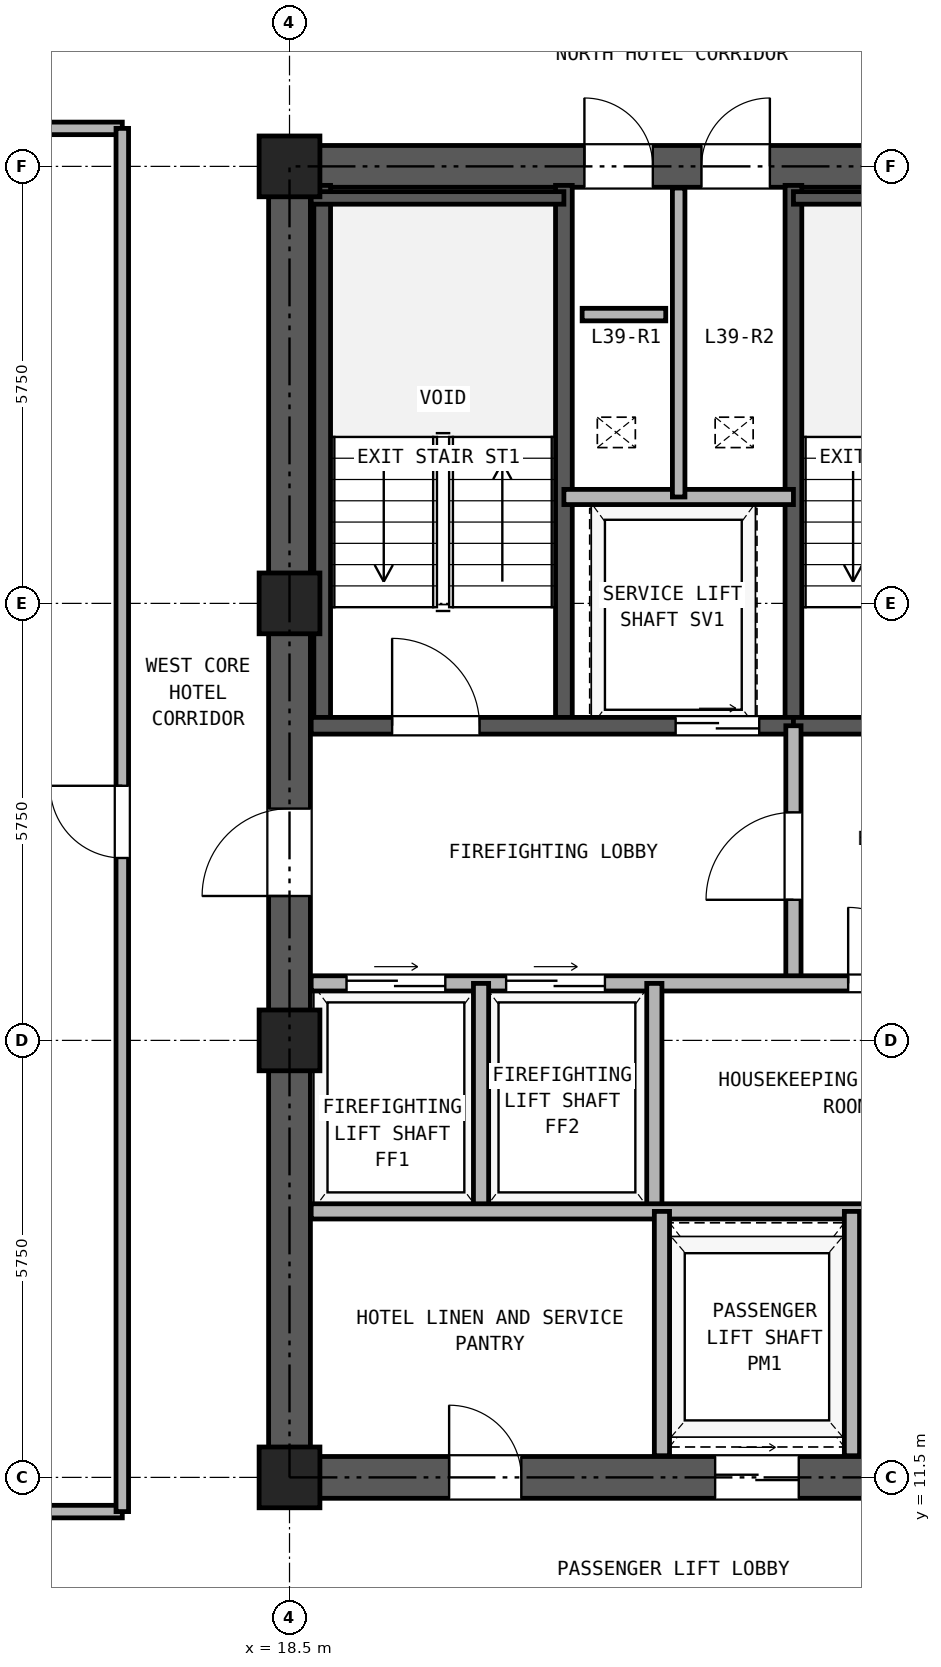
"""IFC4 building model, lengths in metres.
Left out: names, types, materials, properties, quantities, classifications, styles, units other than length and angle.
Written with IfcOpenShell. Run it as: python <this file> out.ifc"""

import sys

from ifc_helpers import new_model, si_unit, direction, frame, frame_2d, origin, origin_2d, place, context, subcontext, project, spatial, rectangle, hollow_rectangle, extrude, source, transform, mapped, element, fill, save


model = new_model("IFC4")
c1 = context("Model", 3, precision=1e-05, world=origin(), true_north=direction((0.0, 1.0)))
c2 = subcontext(c1, "Body", "Model", "MODEL_VIEW")
j1 = project(units=[si_unit("LENGTHUNIT", "METRE"), si_unit("PLANEANGLEUNIT", "RADIAN")], contexts=[c1])
p1 = place(None, origin())
s1 = spatial("IfcSite", under=j1, at=p1, CompositionType="ELEMENT")
p2 = place(p1, origin())
s2 = spatial("IfcBuilding", under=s1, at=p2, CompositionType="ELEMENT")
p3 = place(p2, frame((0.0, 0.0, 140.7)))
s3 = spatial("IfcBuildingStorey", under=s2, at=p3, CompositionType="ELEMENT", Elevation=140.7)
m1 = source(origin(), c2, "Body", "SweptSolid", [
    extrude(hollow_rectangle(XDim=0.8, YDim=0.8, WallThickness=0.045, at=origin_2d()), origin(), (0.0, 0.0, 1.0), 2.84),
])
for number, where, z_axis, x_axis in (
    (1, (18.5, 11.5, 0.0), (0.0, 0.0, 1.0), (1.0, 0.0, 0.0)),
    (2, (18.5, 17.25, 0.0), (0.0, 0.0, 1.0), (1.0, 0.0, 0.0)),
    (3, (18.5, 23.0, 0.0), (0.0, 0.0, 1.0), (1.0, 0.0, 0.0)),
    (4, (18.5, 28.75, 0.0), (0.0, 0.0, 1.0), (1.0, 0.0, 0.0)),
):
    element("IfcColumn", number, at=place(p3, frame(where, z_axis=z_axis, x_axis=x_axis)), inside=s3, PredefinedType="COLUMN", context=c2, shape_type="MappedRepresentation", body=[
        mapped(m1, transform((0.0, 0.0, 0.0), x_axis=(1.0, 0.0, 0.0), y_axis=(0.0, 1.0, 0.0), z_axis=(0.0, 0.0, 1.0), scale=1.0)),
    ])
p4 = place(p3, frame((18.225, 11.5, 0.0), z_axis=(0.0, 0.0, 1.0), x_axis=(1.0, 0.0, 0.0)))
e5 = element("IfcWall", 5, at=p4, inside=s3, PredefinedType="SHEAR", context=c2, shape_type="SweptSolid", body=[
    extrude(rectangle(XDim=10.55, YDim=0.55, at=frame_2d((5.275, 0.0))), origin(), (0.0, 0.0, 1.0), 2.84),
])
p5 = place(p4, frame((2.375, 0.0, 0.0)))
e6 = element("IfcOpeningElement", 6, at=p5, cuts=e5, PredefinedType="OPENING", context=c2, shape_type="SweptSolid", body=[
    extrude(rectangle(XDim=0.95, YDim=2.15, at=frame_2d((0.475, 1.075))), frame((0.0, 0.285, 0.0), z_axis=(0.0, -1.0, 0.0), x_axis=(1.0, 0.0, 0.0)), (0.0, 0.0, 1.0), 0.57),
])
p6 = place(p4, frame((5.875, 0.0, 0.0)))
e7 = element("IfcOpeningElement", 7, at=p6, cuts=e5, PredefinedType="OPENING", context=c2, shape_type="SweptSolid", body=[
    extrude(rectangle(XDim=1.1, YDim=2.25, at=frame_2d((0.55, 1.125))), frame((0.0, 0.285, 0.0), z_axis=(0.0, -1.0, 0.0), x_axis=(1.0, 0.0, 0.0)), (0.0, 0.0, 1.0), 0.57),
])
p7 = place(p4, frame((8.275, 0.0, 0.0)))
e8 = element("IfcOpeningElement", 8, at=p7, cuts=e5, PredefinedType="OPENING", context=c2, shape_type="SweptSolid", body=[
    extrude(rectangle(XDim=1.1, YDim=2.25, at=frame_2d((0.55, 1.125))), frame((0.0, 0.285, 0.0), z_axis=(0.0, -1.0, 0.0), x_axis=(1.0, 0.0, 0.0)), (0.0, 0.0, 1.0), 0.57),
])
p8 = place(p3, frame((18.225, 28.75, 0.0), z_axis=(0.0, 0.0, 1.0), x_axis=(1.0, 0.0, 0.0)))
e9 = element("IfcWall", 9, at=p8, inside=s3, PredefinedType="SHEAR", context=c2, shape_type="SweptSolid", body=[
    extrude(rectangle(XDim=10.55, YDim=0.55, at=frame_2d((5.275, 0.0))), origin(), (0.0, 0.0, 1.0), 2.84),
])
p9 = place(p8, frame((4.155, 0.0, 0.0)))
e10 = element("IfcOpeningElement", 10, at=p9, cuts=e9, PredefinedType="OPENING", context=c2, shape_type="SweptSolid", body=[
    extrude(rectangle(XDim=0.9, YDim=2.05, at=frame_2d((0.45, 1.025))), frame((0.0, 0.285, 0.0), z_axis=(0.0, -1.0, 0.0), x_axis=(1.0, 0.0, 0.0)), (0.0, 0.0, 1.0), 0.57),
])
p10 = place(p8, frame((5.695, 0.0, 0.0)))
e11 = element("IfcOpeningElement", 11, at=p10, cuts=e9, PredefinedType="OPENING", context=c2, shape_type="SweptSolid", body=[
    extrude(rectangle(XDim=0.9, YDim=2.05, at=frame_2d((0.45, 1.025))), frame((0.0, 0.285, 0.0), z_axis=(0.0, -1.0, 0.0), x_axis=(1.0, 0.0, 0.0)), (0.0, 0.0, 1.0), 0.57),
])
p11 = place(p3, frame((18.5, 11.775, 0.0), z_axis=(0.0, 0.0, 1.0), x_axis=(0.0, 1.0, 0.0)))
e12 = element("IfcWall", 12, at=p11, inside=s3, PredefinedType="SHEAR", context=c2, shape_type="SweptSolid", body=[
    extrude(rectangle(XDim=16.7, YDim=0.55, at=frame_2d((8.35, 0.0))), origin(), (0.0, 0.0, 1.0), 2.84),
])
p12 = place(p11, frame((7.375, 0.0, 0.0)))
e13 = element("IfcOpeningElement", 13, at=p12, cuts=e12, PredefinedType="OPENING", context=c2, shape_type="SweptSolid", body=[
    extrude(rectangle(XDim=1.15, YDim=2.2, at=frame_2d((0.575, 1.1))), frame((0.0, 0.285, 0.0), z_axis=(0.0, -1.0, 0.0), x_axis=(1.0, 0.0, 0.0)), (0.0, 0.0, 1.0), 0.57),
])
for number, where, z_axis, x_axis in (
    (14, (18.93, 21.39, 0.0), (0.0, 0.0, 1.0), (0.0, 1.0, 0.0)),
    (15, (22.11, 21.39, 0.0), (0.0, 0.0, 1.0), (0.0, 1.0, 0.0)),
    (16, (25.13, 21.39, 0.0), (0.0, 0.0, 1.0), (0.0, 1.0, 0.0)),
):
    element("IfcWall", number, at=place(p3, frame(where, z_axis=z_axis, x_axis=x_axis)), inside=s3, PredefinedType="SOLIDWALL", context=c2, shape_type="SweptSolid", body=[
        extrude(rectangle(XDim=7.11, YDim=0.22, at=frame_2d((3.555, 0.0))), origin(), (0.0, 0.0, 1.0), 2.84),
    ])
p13 = place(p3, frame((18.785, 28.335, 0.0), z_axis=(0.0, 0.0, 1.0), x_axis=(1.0, 0.0, 0.0)))
e17 = element("IfcWall", 17, at=p13, inside=s3, PredefinedType="PARTITIONING", context=c2, shape_type="SweptSolid", body=[
    extrude(rectangle(XDim=3.325, YDim=0.165, at=frame_2d((1.663, 0.0))), origin(), (0.0, 0.0, 1.0), 2.84),
])
p14 = place(p3, frame((25.13, 28.335, 0.0), z_axis=(0.0, 0.0, 1.0), x_axis=(1.0, 0.0, 0.0)))
e18 = element("IfcWall", 18, at=p14, inside=s3, PredefinedType="PARTITIONING", context=c2, shape_type="SweptSolid", body=[
    extrude(rectangle(XDim=3.085, YDim=0.165, at=frame_2d((1.542, 0.0))), origin(), (0.0, 0.0, 1.0), 2.84),
])
p15 = place(p3, frame((18.785, 21.39, 0.0), z_axis=(0.0, 0.0, 1.0), x_axis=(1.0, 0.0, 0.0)))
e19 = element("IfcWall", 19, at=p15, inside=s3, PredefinedType="SOLIDWALL", context=c2, shape_type="SweptSolid", body=[
    extrude(rectangle(XDim=6.345, YDim=0.22, at=frame_2d((3.172, 0.0))), origin(), (0.0, 0.0, 1.0), 2.84),
])
p16 = place(p15, frame((1.065, 0.0, 0.0)))
e20 = element("IfcOpeningElement", 20, at=p16, cuts=e19, PredefinedType="OPENING", context=c2, shape_type="SweptSolid", body=[
    extrude(rectangle(XDim=1.15, YDim=2.2, at=frame_2d((0.575, 1.1))), frame((0.0, 0.12, 0.0), z_axis=(0.0, -1.0, 0.0), x_axis=(1.0, 0.0, 0.0)), (0.0, 0.0, 1.0), 0.24),
])
p17 = place(p15, frame((4.795, 0.0, 0.0)))
e21 = element("IfcOpeningElement", 21, at=p17, cuts=e19, PredefinedType="OPENING", context=c2, shape_type="SweptSolid", body=[
    extrude(rectangle(XDim=1.1, YDim=2.25, at=frame_2d((0.55, 1.125))), frame((0.0, 0.12, 0.0), z_axis=(0.0, -1.0, 0.0), x_axis=(1.0, 0.0, 0.0)), (0.0, 0.0, 1.0), 0.24),
])
p18 = place(p3, frame((25.13, 21.39, 0.0), z_axis=(0.0, 0.0, 1.0), x_axis=(1.0, 0.0, 0.0)))
e22 = element("IfcWall", 22, at=p18, inside=s3, PredefinedType="SOLIDWALL", context=c2, shape_type="SweptSolid", body=[
    extrude(rectangle(XDim=3.085, YDim=0.22, at=frame_2d((1.542, 0.0))), origin(), (0.0, 0.0, 1.0), 2.84),
])
p19 = place(p18, frame((0.92, 0.0, 0.0)))
e23 = element("IfcOpeningElement", 23, at=p19, cuts=e22, PredefinedType="OPENING", context=c2, shape_type="SweptSolid", body=[
    extrude(rectangle(XDim=1.15, YDim=2.2, at=frame_2d((0.575, 1.1))), frame((0.0, 0.12, 0.0), z_axis=(0.0, -1.0, 0.0), x_axis=(1.0, 0.0, 0.0)), (0.0, 0.0, 1.0), 0.24),
])
p20 = place(p3, frame((22.11, 24.4, 0.0), z_axis=(0.0, 0.0, 1.0), x_axis=(1.0, 0.0, 0.0)))
e24 = element("IfcWall", 24, at=p20, inside=s3, PredefinedType="PARTITIONING", context=c2, shape_type="SweptSolid", body=[
    extrude(rectangle(XDim=3.02, YDim=0.2, at=frame_2d((1.51, 0.0))), origin(), (0.0, 0.0, 1.0), 2.84),
])
p21 = place(p3, frame((23.62, 24.4, 0.0), z_axis=(0.0, 0.0, 1.0), x_axis=(0.0, 1.0, 0.0)))
e25 = element("IfcWall", 25, at=p21, inside=s3, PredefinedType="PARTITIONING", context=c2, shape_type="SweptSolid", body=[
    extrude(rectangle(XDim=4.065, YDim=0.165, at=frame_2d((2.033, 0.0))), origin(), (0.0, 0.0, 1.0), 2.84),
])
p22 = place(p3, frame((25.13, 18.0, 0.0), z_axis=(0.0, 0.0, 1.0), x_axis=(0.0, 1.0, 0.0)))
e26 = element("IfcWall", 26, at=p22, inside=s3, PredefinedType="PARTITIONING", context=c2, shape_type="SweptSolid", body=[
    extrude(rectangle(XDim=3.39, YDim=0.2, at=frame_2d((1.695, 0.0))), origin(), (0.0, 0.0, 1.0), 2.84),
])
p23 = place(p22, frame((1.1, 0.0, 0.0)))
e27 = element("IfcOpeningElement", 27, at=p23, cuts=e26, PredefinedType="OPENING", context=c2, shape_type="SweptSolid", body=[
    extrude(rectangle(XDim=1.15, YDim=2.2, at=frame_2d((0.575, 1.1))), frame((0.0, 0.11, 0.0), z_axis=(0.0, -1.0, 0.0), x_axis=(1.0, 0.0, 0.0)), (0.0, 0.0, 1.0), 0.22),
])
p24 = place(p3, frame((18.785, 18.0, 0.0), z_axis=(0.0, 0.0, 1.0), x_axis=(1.0, 0.0, 0.0)))
e28 = element("IfcWall", 28, at=p24, inside=s3, PredefinedType="PARTITIONING", context=c2, shape_type="SweptSolid", body=[
    extrude(rectangle(XDim=9.43, YDim=0.2, at=frame_2d((4.715, 0.0))), origin(), (0.0, 0.0, 1.0), 2.84),
])
p25 = place(p24, frame((0.465, 0.0, 0.0)))
e29 = element("IfcOpeningElement", 29, at=p25, cuts=e28, PredefinedType="OPENING", context=c2, shape_type="SweptSolid", body=[
    extrude(rectangle(XDim=1.3, YDim=2.3, at=frame_2d((0.65, 1.15))), frame((0.0, 0.11, 0.0), z_axis=(0.0, -1.0, 0.0), x_axis=(1.0, 0.0, 0.0)), (0.0, 0.0, 1.0), 0.22),
])
p26 = place(p24, frame((2.565, 0.0, 0.0)))
e30 = element("IfcOpeningElement", 30, at=p26, cuts=e28, PredefinedType="OPENING", context=c2, shape_type="SweptSolid", body=[
    extrude(rectangle(XDim=1.3, YDim=2.3, at=frame_2d((0.65, 1.15))), frame((0.0, 0.11, 0.0), z_axis=(0.0, -1.0, 0.0), x_axis=(1.0, 0.0, 0.0)), (0.0, 0.0, 1.0), 0.22),
])
p27 = place(p24, frame((7.065, 0.0, 0.0)))
e31 = element("IfcOpeningElement", 31, at=p27, cuts=e28, PredefinedType="OPENING", context=c2, shape_type="SweptSolid", body=[
    extrude(rectangle(XDim=1.0, YDim=2.15, at=frame_2d((0.5, 1.075))), frame((0.0, 0.11, 0.0), z_axis=(0.0, -1.0, 0.0), x_axis=(1.0, 0.0, 0.0)), (0.0, 0.0, 1.0), 0.22),
])
for number, where, z_axis, x_axis in (
    (32, (21.02, 15.0, 0.0), (0.0, 0.0, 1.0), (0.0, 1.0, 0.0)),
    (33, (23.3, 15.0, 0.0), (0.0, 0.0, 1.0), (0.0, 1.0, 0.0)),
):
    element("IfcWall", number, at=place(p3, frame(where, z_axis=z_axis, x_axis=x_axis)), inside=s3, PredefinedType="PARTITIONING", context=c2, shape_type="SweptSolid", body=[
        extrude(rectangle(XDim=3.0, YDim=0.2, at=frame_2d((1.5, 0.0))), origin(), (0.0, 0.0, 1.0), 2.84),
    ])
p28 = place(p3, frame((18.785, 15.0, 0.0), z_axis=(0.0, 0.0, 1.0), x_axis=(1.0, 0.0, 0.0)))
e34 = element("IfcWall", 34, at=p28, inside=s3, PredefinedType="PARTITIONING", context=c2, shape_type="SweptSolid", body=[
    extrude(rectangle(XDim=9.43, YDim=0.2, at=frame_2d((4.715, 0.0))), origin(), (0.0, 0.0, 1.0), 2.84),
])
for number, where, z_axis, x_axis in (
    (35, (23.4, 11.785, 0.0), (0.0, 0.0, 1.0), (0.0, 1.0, 0.0)),
    (36, (25.9, 11.785, 0.0), (0.0, 0.0, 1.0), (0.0, 1.0, 0.0)),
):
    element("IfcWall", number, at=place(p3, frame(where, z_axis=z_axis, x_axis=x_axis)), inside=s3, PredefinedType="PARTITIONING", context=c2, shape_type="SweptSolid", body=[
        extrude(rectangle(XDim=3.215, YDim=0.2, at=frame_2d((1.607, 0.0))), origin(), (0.0, 0.0, 1.0), 2.84),
    ])
for number, where, z_axis, x_axis in (
    (37, (8.8, 11.05, 0.0), (0.0, 0.0, 1.0), (1.0, 0.0, 0.0)),
    (38, (8.8, 29.25, 0.0), (0.0, 0.0, 1.0), (1.0, 0.0, 0.0)),
):
    element("IfcWall", number, at=place(p3, frame(where, z_axis=z_axis, x_axis=x_axis)), inside=s3, PredefinedType="PARTITIONING", context=c2, shape_type="SweptSolid", body=[
        extrude(rectangle(XDim=7.5, YDim=0.165, at=frame_2d((3.75, 0.0))), origin(), (0.0, 0.0, 1.0), 2.84),
    ])
p29 = place(p3, frame((16.3, 11.05, 0.0), z_axis=(0.0, 0.0, 1.0), x_axis=(0.0, 1.0, 0.0)))
e39 = element("IfcWall", 39, at=p29, inside=s3, PredefinedType="PARTITIONING", context=c2, shape_type="SweptSolid", body=[
    extrude(rectangle(XDim=18.2, YDim=0.165, at=frame_2d((9.1, 0.0))), origin(), (0.0, 0.0, 1.0), 2.84),
])
p30 = place(p29, frame((8.6, 0.0, 0.0)))
e40 = element("IfcOpeningElement", 40, at=p30, cuts=e39, PredefinedType="OPENING", context=c2, shape_type="SweptSolid", body=[
    extrude(rectangle(XDim=0.95, YDim=2.15, at=frame_2d((0.475, 1.075))), frame((0.0, 0.093, 0.0), z_axis=(0.0, -1.0, 0.0), x_axis=(1.0, 0.0, 0.0)), (0.0, 0.0, 1.0), 0.185),
])
p31 = place(p3, frame((22.35, 26.8, 0.0), z_axis=(0.0, 0.0, 1.0), x_axis=(1.0, 0.0, 0.0)))
e41 = element("IfcWall", 41, at=p31, inside=s3, PredefinedType="PARTITIONING", context=c2, shape_type="SweptSolid", body=[
    extrude(rectangle(XDim=1.1, YDim=0.165, at=frame_2d((0.55, 0.0))), origin(), (0.0, 0.0, 1.0), 2.84),
])
p32 = place(p16, frame((1.15, 0.0, 0.0), z_axis=(0.0, 0.0, 1.0), x_axis=(-1.0, 0.0, 0.0)))
e42 = element("IfcDoor", 42, at=p32, inside=s3, OperationType="SINGLE_SWING_LEFT", PredefinedType="DOOR", context=c2, shape_type="SweptSolid", body=[
    extrude(rectangle(XDim=1.15, YDim=2.2, at=frame_2d((0.575, 1.1))), frame((0.0, 0.025, 0.0), z_axis=(0.0, -1.0, 0.0), x_axis=(1.0, 0.0, 0.0)), (0.0, 0.0, 1.0), 0.05),
])
fill(e20, e42)
p33 = place(p17, frame((1.1, 0.0, 0.0), z_axis=(0.0, 0.0, 1.0), x_axis=(-1.0, 0.0, 0.0)))
e43 = element("IfcDoor", 43, at=p33, inside=s3, OperationType="DOUBLE_DOOR_SLIDING", PredefinedType="DOOR", context=c2, shape_type="SweptSolid", body=[
    extrude(rectangle(XDim=1.1, YDim=2.25, at=frame_2d((0.55, 1.125))), frame((0.0, 0.025, 0.0), z_axis=(0.0, -1.0, 0.0), x_axis=(1.0, 0.0, 0.0)), (0.0, 0.0, 1.0), 0.05),
])
fill(e21, e43)
p34 = place(p23, origin())
e44 = element("IfcDoor", 44, at=p34, inside=s3, OperationType="SINGLE_SWING_LEFT", PredefinedType="DOOR", context=c2, shape_type="SweptSolid", body=[
    extrude(rectangle(XDim=1.15, YDim=2.2, at=frame_2d((0.575, 1.1))), frame((0.0, 0.025, 0.0), z_axis=(0.0, -1.0, 0.0), x_axis=(1.0, 0.0, 0.0)), (0.0, 0.0, 1.0), 0.05),
])
fill(e27, e44)
p35 = place(p25, origin())
e45 = element("IfcDoor", 45, at=p35, inside=s3, OperationType="DOUBLE_DOOR_SLIDING", PredefinedType="DOOR", context=c2, shape_type="SweptSolid", body=[
    extrude(rectangle(XDim=1.3, YDim=2.3, at=frame_2d((0.65, 1.15))), frame((0.0, 0.025, 0.0), z_axis=(0.0, -1.0, 0.0), x_axis=(1.0, 0.0, 0.0)), (0.0, 0.0, 1.0), 0.05),
])
fill(e29, e45)
p36 = place(p26, origin())
e46 = element("IfcDoor", 46, at=p36, inside=s3, OperationType="DOUBLE_DOOR_SLIDING", PredefinedType="DOOR", context=c2, shape_type="SweptSolid", body=[
    extrude(rectangle(XDim=1.3, YDim=2.3, at=frame_2d((0.65, 1.15))), frame((0.0, 0.025, 0.0), z_axis=(0.0, -1.0, 0.0), x_axis=(1.0, 0.0, 0.0)), (0.0, 0.0, 1.0), 0.05),
])
fill(e30, e46)
p37 = place(p27, frame((1.0, 0.0, 0.0), z_axis=(0.0, 0.0, 1.0), x_axis=(-1.0, 0.0, 0.0)))
e47 = element("IfcDoor", 47, at=p37, inside=s3, OperationType="SINGLE_SWING_LEFT", PredefinedType="DOOR", context=c2, shape_type="SweptSolid", body=[
    extrude(rectangle(XDim=1.0, YDim=2.15, at=frame_2d((0.5, 1.075))), frame((0.0, 0.025, 0.0), z_axis=(0.0, -1.0, 0.0), x_axis=(1.0, 0.0, 0.0)), (0.0, 0.0, 1.0), 0.05),
])
fill(e31, e47)
p38 = place(p12, frame((1.15, 0.0, 0.0), z_axis=(0.0, 0.0, 1.0), x_axis=(-1.0, 0.0, 0.0)))
e48 = element("IfcDoor", 48, at=p38, inside=s3, OperationType="SINGLE_SWING_LEFT", PredefinedType="DOOR", context=c2, shape_type="SweptSolid", body=[
    extrude(rectangle(XDim=1.15, YDim=2.2, at=frame_2d((0.575, 1.1))), frame((0.0, 0.025, 0.0), z_axis=(0.0, -1.0, 0.0), x_axis=(1.0, 0.0, 0.0)), (0.0, 0.0, 1.0), 0.05),
])
fill(e13, e48)
p39 = place(p9, origin())
e49 = element("IfcDoor", 49, at=p39, inside=s3, OperationType="SINGLE_SWING_LEFT", PredefinedType="DOOR", context=c2, shape_type="SweptSolid", body=[
    extrude(rectangle(XDim=0.9, YDim=2.05, at=frame_2d((0.45, 1.025))), frame((0.0, 0.025, 0.0), z_axis=(0.0, -1.0, 0.0), x_axis=(1.0, 0.0, 0.0)), (0.0, 0.0, 1.0), 0.05),
])
fill(e10, e49)
p40 = place(p10, origin())
e50 = element("IfcDoor", 50, at=p40, inside=s3, OperationType="SINGLE_SWING_RIGHT", PredefinedType="DOOR", context=c2, shape_type="SweptSolid", body=[
    extrude(rectangle(XDim=0.9, YDim=2.05, at=frame_2d((0.45, 1.025))), frame((0.0, 0.025, 0.0), z_axis=(0.0, -1.0, 0.0), x_axis=(1.0, 0.0, 0.0)), (0.0, 0.0, 1.0), 0.05),
])
fill(e11, e50)
p41 = place(p5, frame((0.95, 0.0, 0.0), z_axis=(0.0, 0.0, 1.0), x_axis=(-1.0, 0.0, 0.0)))
e51 = element("IfcDoor", 51, at=p41, inside=s3, OperationType="SINGLE_SWING_LEFT", PredefinedType="DOOR", context=c2, shape_type="SweptSolid", body=[
    extrude(rectangle(XDim=0.95, YDim=2.15, at=frame_2d((0.475, 1.075))), frame((0.0, 0.025, 0.0), z_axis=(0.0, -1.0, 0.0), x_axis=(1.0, 0.0, 0.0)), (0.0, 0.0, 1.0), 0.05),
])
fill(e6, e51)
p42 = place(p6, frame((1.1, 0.0, 0.0), z_axis=(0.0, 0.0, 1.0), x_axis=(-1.0, 0.0, 0.0)))
e52 = element("IfcDoor", 52, at=p42, inside=s3, OperationType="DOUBLE_DOOR_SLIDING", PredefinedType="DOOR", context=c2, shape_type="SweptSolid", body=[
    extrude(rectangle(XDim=1.1, YDim=2.25, at=frame_2d((0.55, 1.125))), frame((0.0, 0.025, 0.0), z_axis=(0.0, -1.0, 0.0), x_axis=(1.0, 0.0, 0.0)), (0.0, 0.0, 1.0), 0.05),
])
fill(e7, e52)
p43 = place(p30, frame((0.95, 0.0, 0.0), z_axis=(0.0, 0.0, 1.0), x_axis=(-1.0, 0.0, 0.0)))
e53 = element("IfcDoor", 53, at=p43, inside=s3, OperationType="SINGLE_SWING_RIGHT", PredefinedType="DOOR", context=c2, shape_type="SweptSolid", body=[
    extrude(rectangle(XDim=0.95, YDim=2.15, at=frame_2d((0.475, 1.075))), frame((0.0, 0.025, 0.0), z_axis=(0.0, -1.0, 0.0), x_axis=(1.0, 0.0, 0.0)), (0.0, 0.0, 1.0), 0.05),
])
fill(e40, e53)
save(model, sys.argv[1])
